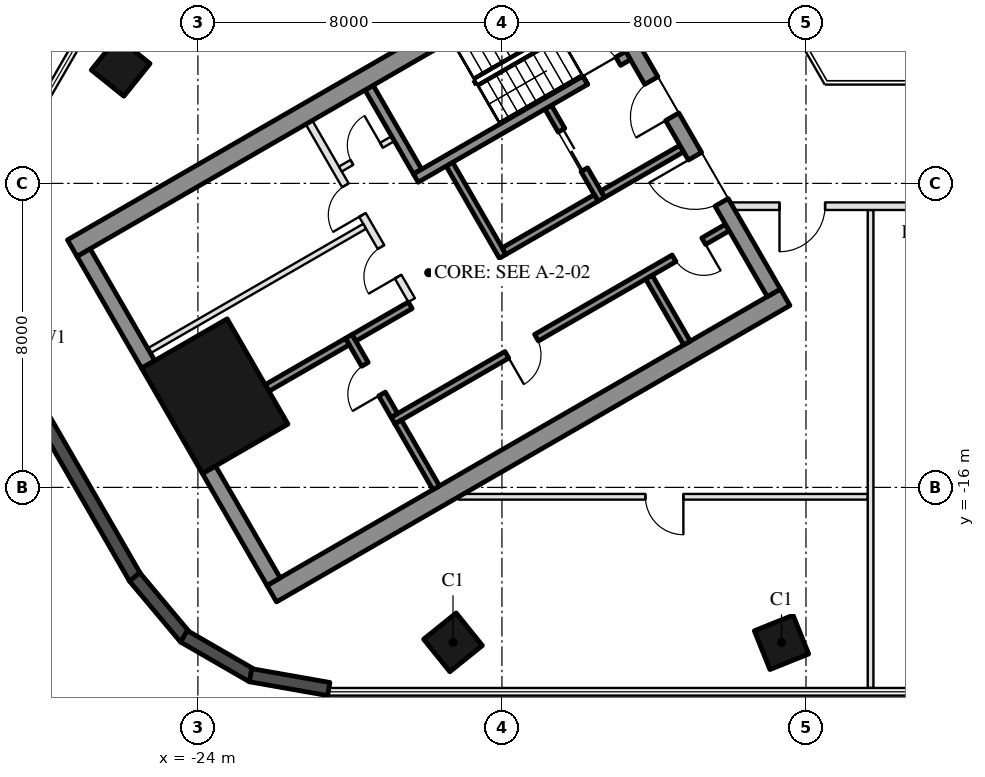
"""IFC4 building model, lengths in metres.
Left out: names, types, materials, properties, quantities, classifications, styles, units other than length and angle.
Written with IfcOpenShell. Run it as: python <this file> out.ifc"""

import sys

from ifc_helpers import new_model, si_unit, direction, frame, frame_2d, origin, origin_2d, place, context, subcontext, project, spatial, rectangle, hollow_rectangle, extrude, boolean, halfspace, element, fill, save


model = new_model("IFC4")
c1 = context("Model", 3, precision=1e-05, world=origin(), true_north=direction((0.0, 1.0)))
c2 = subcontext(c1, "Body", "Model", "MODEL_VIEW")
j1 = project(units=[si_unit("LENGTHUNIT", "METRE"), si_unit("PLANEANGLEUNIT", "RADIAN")], contexts=[c1])
p1 = place(None, origin())
s1 = spatial("IfcSite", under=j1, at=p1, CompositionType="ELEMENT")
p2 = place(p1, origin())
s2 = spatial("IfcBuilding", under=s1, at=p2, CompositionType="ELEMENT")
p3 = place(p2, frame((0.0, 0.0, 9.0)))
s3 = spatial("IfcBuildingStorey", under=s2, at=p3, CompositionType="ELEMENT", Elevation=9.0)
p4 = place(p3, frame((-17.288, -20.078, 0.0), z_axis=(0.091482931519, 0.113703399857, 0.989293894705), x_axis=(-0.99579173161, 0.005008593821, 0.091508148518)))
e1 = element("IfcColumn", 1, at=p4, inside=s3, PredefinedType="COLUMN", context=c2, shape_type="SweptSolid", body=[
    boolean("DIFFERENCE", boolean("DIFFERENCE", extrude(hollow_rectangle(XDim=1.1, YDim=1.1, WallThickness=0.05, at=origin_2d()), origin(), (0.0, 0.0, 1.0), 6.57), halfspace(frame((0.0, 0.0, 0.019), z_axis=(0.0, 0.0, 1.0), x_axis=(1.0, 0.0, 0.0)), True)), halfspace(frame((0.0, 0.0, 6.552), z_axis=(0.0, 0.0, 1.0), x_axis=(1.0, 0.0, 0.0)), False)),
])
p5 = place(p3, frame((-8.644, -20.078, 0.0), z_axis=(0.04588570117, 0.114061937921, 0.9924134102), x_axis=(-0.998942832746, 0.002476202234, 0.045902999109)))
e2 = element("IfcColumn", 2, at=p5, inside=s3, PredefinedType="COLUMN", context=c2, shape_type="SweptSolid", body=[
    boolean("DIFFERENCE", boolean("DIFFERENCE", extrude(hollow_rectangle(XDim=1.1, YDim=1.1, WallThickness=0.05, at=origin_2d()), origin(), (0.0, 0.0, 1.0), 6.55), halfspace(frame((0.0, 0.0, 0.017), z_axis=(0.0, 0.0, 1.0), x_axis=(1.0, 0.0, 0.0)), True)), halfspace(frame((0.0, 0.0, 6.534), z_axis=(0.0, 0.0, 1.0), x_axis=(1.0, 0.0, 0.0)), False)),
])
p6 = place(p3, frame((-26.032, -4.932, 0.0), z_axis=(0.144210024077, 0.022406246977, 0.989293398872), x_axis=(-0.493357756794, -0.864999630049, 0.091508271899)))
e3 = element("IfcColumn", 3, at=p6, inside=s3, PredefinedType="COLUMN", context=c2, shape_type="SweptSolid", body=[
    boolean("DIFFERENCE", boolean("DIFFERENCE", extrude(hollow_rectangle(XDim=1.1, YDim=1.1, WallThickness=0.05, at=origin_2d()), origin(), (0.0, 0.0, 1.0), 6.57), halfspace(frame((0.0, 0.0, 0.019), z_axis=(0.0, 0.0, 1.0), x_axis=(1.0, 0.0, 0.0)), True)), halfspace(frame((0.0, 0.0, 6.552), z_axis=(0.0, 0.0, 1.0), x_axis=(1.0, 0.0, 0.0)), False)),
])
p7 = place(p3, frame((-23.556, -13.6, 0.0), z_axis=(0.0, 0.0, 1.0), x_axis=(-0.5, 0.866025403784, 0.0)))
e4 = element("IfcColumn", 4, at=p7, inside=s3, PredefinedType="COLUMN", context=c2, shape_type="SweptSolid", body=[
    extrude(hollow_rectangle(XDim=3.2, YDim=2.6, WallThickness=0.08, at=origin_2d()), origin(), (0.0, 0.0, 1.0), 6.5),
])
p8 = place(p3, frame((-28.743, -13.021, 0.0), z_axis=(0.0, 0.0, 1.0), x_axis=(0.499981900942, -0.866035853028, 0.0)))
e5 = element("IfcWall", 5, at=p8, inside=s3, PredefinedType="SOLIDWALL", context=c2, shape_type="SweptSolid", body=[
    extrude(rectangle(XDim=6.191, YDim=0.35, at=frame_2d((3.095, 0.0))), origin(), (0.0, 0.0, 1.0), 6.15),
])
p9 = place(p3, frame((-25.665, -18.357, 0.0), z_axis=(0.0, 0.0, 1.0), x_axis=(0.642731712352, -0.766091343076, 0.0)))
e6 = element("IfcWall", 6, at=p9, inside=s3, PredefinedType="SOLIDWALL", context=c2, shape_type="SweptSolid", body=[
    extrude(rectangle(XDim=2.09, YDim=0.35, at=frame_2d((1.045, 0.0))), origin(), (0.0, 0.0, 1.0), 6.15),
])
p10 = place(p3, frame((-24.368, -19.919, 0.0), z_axis=(0.0, 0.0, 1.0), x_axis=(0.866049423672, -0.499958394027, 0.0)))
e7 = element("IfcWall", 7, at=p10, inside=s3, PredefinedType="SOLIDWALL", context=c2, shape_type="SweptSolid", body=[
    extrude(rectangle(XDim=2.09, YDim=0.35, at=frame_2d((1.045, 0.0))), origin(), (0.0, 0.0, 1.0), 6.15),
])
p11 = place(p3, frame((-22.615, -20.943, 0.0), z_axis=(0.0, 0.0, 1.0), x_axis=(0.984816471064, -0.173598727877, 0.0)))
e8 = element("IfcWall", 8, at=p11, inside=s3, PredefinedType="SOLIDWALL", context=c2, shape_type="SweptSolid", body=[
    extrude(rectangle(XDim=2.09, YDim=0.35, at=frame_2d((1.045, 0.0))), origin(), (0.0, 0.0, 1.0), 6.15),
])
p12 = place(p3, frame((-8.547, -10.997, 0.0), z_axis=(0.0, 0.0, 1.0), x_axis=(-0.866024264262, -0.500001973705, 0.0)))
e9 = element("IfcWall", 9, at=p12, inside=s3, PredefinedType="SHEAR", context=c2, shape_type="SweptSolid", body=[
    extrude(rectangle(XDim=15.6, YDim=0.5, at=frame_2d((7.8, 0.0))), origin(), (0.0, 0.0, 1.0), 6.15),
])
p13 = place(p3, frame((-23.708, -15.536, 0.0), z_axis=(0.0, 0.0, 1.0), x_axis=(0.500008388397, -0.866020560687, 0.0)))
e10 = element("IfcWall", 10, at=p13, inside=s3, PredefinedType="SHEAR", context=c2, shape_type="SweptSolid", body=[
    extrude(rectangle(XDim=3.4, YDim=0.4, at=frame_2d((1.7, 0.0))), origin(), (0.0, 0.0, 1.0), 6.15),
])
p14 = place(p3, frame((-27.009, -9.82, 0.0), z_axis=(0.0, 0.0, 1.0), x_axis=(0.499977295307, -0.866038511948, 0.0)))
e11 = element("IfcWall", 11, at=p14, inside=s3, PredefinedType="SHEAR", context=c2, shape_type="SweptSolid", body=[
    extrude(rectangle(XDim=3.4, YDim=0.4, at=frame_2d((1.7, 0.0))), origin(), (0.0, 0.0, 1.0), 6.15),
])
p15 = place(p3, frame((-19.496, -5.482, 0.0), z_axis=(0.0, 0.0, 1.0), x_axis=(0.499990435942, -0.866030925526, 0.0)))
e12 = element("IfcWall", 12, at=p15, inside=s3, PredefinedType="SHEAR", context=c2, shape_type="SweptSolid", body=[
    extrude(rectangle(XDim=2.55, YDim=0.25, at=frame_2d((1.275, 0.0))), origin(), (0.0, 0.0, 1.0), 6.15),
])
p16 = place(p3, frame((-17.381, -7.495, 0.0), z_axis=(0.0, 0.0, 1.0), x_axis=(0.500011755427, -0.866018616679, 0.0)))
e13 = element("IfcWall", 13, at=p16, inside=s3, PredefinedType="SHEAR", context=c2, shape_type="SweptSolid", body=[
    extrude(rectangle(XDim=2.8, YDim=0.2, at=frame_2d((1.4, 0.0))), origin(), (0.0, 0.0, 1.0), 6.15),
])
p17 = place(p3, frame((-14.783, -5.995, 0.0), z_axis=(0.0, 0.0, 1.0), x_axis=(0.49994636267, -0.866056369097, 0.0)))
e14 = element("IfcWall", 14, at=p17, inside=s3, PredefinedType="SHEAR", context=c2, shape_type="SweptSolid", body=[
    extrude(rectangle(XDim=2.8, YDim=0.2, at=frame_2d((1.4, 0.0))), origin(), (0.0, 0.0, 1.0), 6.15),
])
p18 = place(p17, frame((0.7, 0.0, 0.0)))
e15 = element("IfcOpeningElement", 15, at=p18, cuts=e14, PredefinedType="OPENING", context=c2, shape_type="SweptSolid", body=[
    extrude(rectangle(XDim=1.2, YDim=2.1, at=frame_2d((0.6, 1.05))), frame((0.0, 0.11, 0.0), z_axis=(0.0, -1.0, 0.0), x_axis=(1.0, 0.0, 0.0)), (0.0, 0.0, 1.0), 0.22),
])
p19 = place(p3, frame((-13.52, -8.383, 0.0), z_axis=(0.0, 0.0, 1.0), x_axis=(-0.866034573852, -0.49998411664, 0.0)))
e16 = element("IfcWall", 16, at=p19, inside=s3, PredefinedType="SHEAR", context=c2, shape_type="SweptSolid", body=[
    extrude(rectangle(XDim=2.8, YDim=0.2, at=frame_2d((1.4, 0.0))), origin(), (0.0, 0.0, 1.0), 6.15),
])
p20 = place(p3, frame((-11.268, -7.083, 0.0), z_axis=(0.0, 0.0, 1.0), x_axis=(-0.866050077142, -0.499957262057, 0.0)))
e17 = element("IfcWall", 17, at=p20, inside=s3, PredefinedType="SHEAR", context=c2, shape_type="SweptSolid", body=[
    extrude(rectangle(XDim=2.4, YDim=0.2, at=frame_2d((1.2, 0.0))), origin(), (0.0, 0.0, 1.0), 6.15),
])
p21 = place(p3, frame((-10.068, -9.162, 0.0), z_axis=(0.0, 0.0, 1.0), x_axis=(-0.866032725843, -0.499987317609, 0.0)))
e18 = element("IfcWall", 18, at=p21, inside=s3, PredefinedType="SHEAR", context=c2, shape_type="SweptSolid", body=[
    extrude(rectangle(XDim=10.16, YDim=0.2, at=frame_2d((5.08, 0.0))), origin(), (0.0, 0.0, 1.0), 6.15),
])
p22 = place(p21, frame((0.72, 0.0, 0.0)))
e19 = element("IfcOpeningElement", 19, at=p22, cuts=e18, PredefinedType="OPENING", context=c2, shape_type="SweptSolid", body=[
    extrude(rectangle(XDim=0.9, YDim=2.1, at=frame_2d((0.45, 1.05))), frame((0.0, 0.11, 0.0), z_axis=(0.0, -1.0, 0.0), x_axis=(1.0, 0.0, 0.0)), (0.0, 0.0, 1.0), 0.22),
])
p23 = place(p21, frame((5.8, 0.0, 0.0)))
e20 = element("IfcOpeningElement", 20, at=p23, cuts=e18, PredefinedType="OPENING", context=c2, shape_type="SweptSolid", body=[
    extrude(rectangle(XDim=0.9, YDim=2.1, at=frame_2d((0.45, 1.05))), frame((0.0, 0.11, 0.0), z_axis=(0.0, -1.0, 0.0), x_axis=(1.0, 0.0, 0.0)), (0.0, 0.0, 1.0), 0.22),
])
p24 = place(p3, frame((-20.031, -12.026, 0.0), z_axis=(0.0, 0.0, 1.0), x_axis=(0.500033551112, -0.866006032174, 0.0)))
e21 = element("IfcWall", 21, at=p24, inside=s3, PredefinedType="SHEAR", context=c2, shape_type="SweptSolid", body=[
    extrude(rectangle(XDim=2.4, YDim=0.2, at=frame_2d((1.2, 0.0))), origin(), (0.0, 0.0, 1.0), 6.15),
])
p25 = place(p24, frame((0.85, 0.0, 0.0)))
e22 = element("IfcOpeningElement", 22, at=p25, cuts=e21, PredefinedType="OPENING", context=c2, shape_type="SweptSolid", body=[
    extrude(rectangle(XDim=0.9, YDim=2.1, at=frame_2d((0.45, 1.05))), frame((0.0, 0.11, 0.0), z_axis=(0.0, -1.0, 0.0), x_axis=(1.0, 0.0, 0.0)), (0.0, 0.0, 1.0), 0.22),
])
p26 = place(p3, frame((-18.413, -11.208, 0.0), z_axis=(0.0, 0.0, 1.0), x_axis=(-0.866038183914, -0.499977863513, 0.0)))
e23 = element("IfcWall", 23, at=p26, inside=s3, PredefinedType="SHEAR", context=c2, shape_type="SweptSolid", body=[
    extrude(rectangle(XDim=1.71, YDim=0.2, at=frame_2d((0.855, 0.0))), origin(), (0.0, 0.0, 1.0), 6.15),
])
for number, where, z_axis, x_axis in (
    (24, (-12.131, -10.468, 0.0), (0.0, 0.0, 1.0), (0.5, -0.866, 0.0)),
    (25, (-18.73, -14.278, 0.0), (0.0, 0.0, 1.0), (0.5, -0.866, 0.0)),
):
    element("IfcWall", number, at=place(p3, frame(where, z_axis=z_axis, x_axis=x_axis)), inside=s3, PredefinedType="SHEAR", context=c2, shape_type="SweptSolid", body=[
        extrude(rectangle(XDim=2.0, YDim=0.2, at=frame_2d((1.0, 0.0))), origin(), (0.0, 0.0, 1.0), 6.15),
    ])
p27 = place(p3, frame((-20.067, -12.163, 0.0), z_axis=(0.0, 0.0, 1.0), x_axis=(-0.866048967903, -0.499959183527, 0.0)))
e26 = element("IfcWall", 26, at=p27, inside=s3, PredefinedType="SHEAR", context=c2, shape_type="SweptSolid", body=[
    extrude(rectangle(XDim=2.44, YDim=0.2, at=frame_2d((1.22, 0.0))), origin(), (0.0, 0.0, 1.0), 6.15),
])
p28 = place(p3, frame((-21.076, -6.395, 0.0), z_axis=(0.0, 0.0, 1.0), x_axis=(0.50001468107, -0.866016927499, 0.0)))
e27 = element("IfcWall", 27, at=p28, inside=s3, PredefinedType="PARTITIONING", context=c2, shape_type="SweptSolid", body=[
    extrude(rectangle(XDim=5.4, YDim=0.2, at=frame_2d((2.7, 0.0))), origin(), (0.0, 0.0, 1.0), 6.15),
])
p29 = place(p28, frame((1.913, 0.0, 0.0)))
e28 = element("IfcOpeningElement", 28, at=p29, cuts=e27, PredefinedType="OPENING", context=c2, shape_type="SweptSolid", body=[
    extrude(rectangle(XDim=0.9, YDim=2.1, at=frame_2d((0.45, 1.05))), frame((0.0, 0.11, 0.0), z_axis=(0.0, -1.0, 0.0), x_axis=(1.0, 0.0, 0.0)), (0.0, 0.0, 1.0), 0.22),
])
p30 = place(p28, frame((3.788, 0.0, 0.0)))
e29 = element("IfcOpeningElement", 29, at=p30, cuts=e27, PredefinedType="OPENING", context=c2, shape_type="SweptSolid", body=[
    extrude(rectangle(XDim=0.9, YDim=2.1, at=frame_2d((0.45, 1.05))), frame((0.0, 0.11, 0.0), z_axis=(0.0, -1.0, 0.0), x_axis=(1.0, 0.0, 0.0)), (0.0, 0.0, 1.0), 0.22),
])
p31 = place(p3, frame((-18.866, -6.822, 0.0), z_axis=(0.0, 0.0, 1.0), x_axis=(-0.866028054938, -0.499995408039, 0.0)))
e30 = element("IfcWall", 30, at=p31, inside=s3, PredefinedType="PARTITIONING", context=c2, shape_type="SweptSolid", body=[
    extrude(rectangle(XDim=1.6, YDim=0.15, at=frame_2d((0.8, 0.0))), origin(), (0.0, 0.0, 1.0), 6.15),
])
p32 = place(p31, frame((0.35, 0.0, 0.0)))
e31 = element("IfcOpeningElement", 31, at=p32, cuts=e30, PredefinedType="OPENING", context=c2, shape_type="SweptSolid", body=[
    extrude(rectangle(XDim=0.9, YDim=2.1, at=frame_2d((0.45, 1.05))), frame((0.0, 0.085, 0.0), z_axis=(0.0, -1.0, 0.0), x_axis=(1.0, 0.0, 0.0)), (0.0, 0.0, 1.0), 0.17),
])
p33 = place(p3, frame((-19.613, -9.13, 0.0), z_axis=(0.0, 0.0, 1.0), x_axis=(-0.866037242061, -0.499979494943, 0.0)))
e32 = element("IfcWall", 32, at=p33, inside=s3, PredefinedType="PARTITIONING", context=c2, shape_type="SweptSolid", body=[
    extrude(rectangle(XDim=6.55, YDim=0.15, at=frame_2d((3.275, 0.0))), origin(), (0.0, 0.0, 1.0), 6.15),
])
p34 = place(p3, frame((-15.274, -2.756, 0.0), z_axis=(0.0, 0.0, 1.0), x_axis=(-0.86602318214, -0.500003847982, 0.0)))
e33 = element("IfcWall", 33, at=p34, inside=s3, PredefinedType="SHEAR", context=c2, shape_type="SweptSolid", body=[
    extrude(rectangle(XDim=13.894, YDim=0.5, at=frame_2d((6.947, 0.0))), origin(), (0.0, 0.0, 1.0), 6.15),
])
p35 = place(p3, frame((-12.57, -4.428, 0.0), z_axis=(0.0, 0.0, 1.0), x_axis=(0.499984378957, -0.86603442241, 0.0)))
e34 = element("IfcWall", 34, at=p35, inside=s3, PredefinedType="SHEAR", context=c2, shape_type="SweptSolid", body=[
    extrude(rectangle(XDim=7.45, YDim=0.4, at=frame_2d((3.725, 0.0))), origin(), (0.0, 0.0, 1.0), 6.15),
])
p36 = place(p35, frame((1.0, 0.0, 0.0)))
e35 = element("IfcOpeningElement", 35, at=p36, cuts=e34, PredefinedType="OPENING", context=c2, shape_type="SweptSolid", body=[
    extrude(rectangle(XDim=1.1, YDim=2.1, at=frame_2d((0.55, 1.05))), frame((0.0, 0.21, 0.0), z_axis=(0.0, -1.0, 0.0), x_axis=(1.0, 0.0, 0.0)), (0.0, 0.0, 1.0), 0.42),
])
p37 = place(p35, frame((3.3, 0.0, 0.0)))
e36 = element("IfcOpeningElement", 36, at=p37, cuts=e34, PredefinedType="OPENING", context=c2, shape_type="SweptSolid", body=[
    extrude(rectangle(XDim=1.4, YDim=2.1, at=frame_2d((0.7, 1.05))), frame((0.0, 0.21, 0.0), z_axis=(0.0, -1.0, 0.0), x_axis=(1.0, 0.0, 0.0)), (0.0, 0.0, 1.0), 0.42),
])
p38 = place(p3, frame((-12.681, -4.636, 0.0), z_axis=(0.0, 0.0, 1.0), x_axis=(-0.86601437931, -0.500019094464, 0.0)))
e37 = element("IfcWall", 37, at=p38, inside=s3, PredefinedType="SHEAR", context=c2, shape_type="SweptSolid", body=[
    extrude(rectangle(XDim=1.306, YDim=0.25, at=frame_2d((0.653, 0.0))), origin(), (0.0, 0.0, 1.0), 6.15),
])
p39 = place(p38, frame((0.3, 0.0, 0.0)))
e38 = element("IfcOpeningElement", 38, at=p39, cuts=e37, PredefinedType="OPENING", context=c2, shape_type="SweptSolid", body=[
    extrude(rectangle(XDim=1.0, YDim=2.1, at=frame_2d((0.5, 1.05))), frame((0.0, 0.135, 0.0), z_axis=(0.0, -1.0, 0.0), x_axis=(1.0, 0.0, 0.0)), (0.0, 0.0, 1.0), 0.27),
])
p40 = place(p3, frame((-13.812, -5.29, 0.0), z_axis=(0.0, 0.0, 1.0), x_axis=(-0.866023561601, -0.500003190742, 0.0)))
e39 = element("IfcWall", 39, at=p40, inside=s3, PredefinedType="SHEAR", context=c2, shape_type="SweptSolid", body=[
    extrude(rectangle(XDim=5.144, YDim=0.25, at=frame_2d((2.572, 0.0))), origin(), (0.0, 0.0, 1.0), 6.15),
])
p41 = place(p3, frame((-17.141, -16.247, 0.0), z_axis=(0.0, 0.0, 1.0), x_axis=(1.0, 0.0, 0.0)))
e40 = element("IfcWall", 40, at=p41, inside=s3, PredefinedType="PARTITIONING", context=c2, shape_type="SweptSolid", body=[
    extrude(rectangle(XDim=10.766, YDim=0.15, at=frame_2d((5.383, 0.0))), origin(), (0.0, 0.0, 1.0), 5.36),
])
p42 = place(p41, frame((4.915, 0.0, 0.0)))
e41 = element("IfcOpeningElement", 41, at=p42, cuts=e40, PredefinedType="OPENING", context=c2, shape_type="SweptSolid", body=[
    extrude(rectangle(XDim=1.0, YDim=2.1, at=frame_2d((0.5, 1.05))), frame((0.0, 0.085, 0.0), z_axis=(0.0, -1.0, 0.0), x_axis=(1.0, 0.0, 0.0)), (0.0, 0.0, 1.0), 0.17),
])
p43 = place(p3, frame((-6.3, -21.278, 0.0), z_axis=(0.0, 0.0, 1.0), x_axis=(0.0, 1.0, 0.0)))
e42 = element("IfcWall", 42, at=p43, inside=s3, PredefinedType="PARTITIONING", context=c2, shape_type="SweptSolid", body=[
    extrude(rectangle(XDim=12.578, YDim=0.15, at=frame_2d((6.289, 0.0))), origin(), (0.0, 0.0, 1.0), 5.55),
])
p44 = place(p3, frame((-9.93, -8.6, 0.0), z_axis=(0.0, 0.0, 1.0), x_axis=(1.0, 0.0, 0.0)))
e43 = element("IfcWall", 43, at=p44, inside=s3, PredefinedType="PARTITIONING", context=c2, shape_type="SweptSolid", body=[
    extrude(rectangle(XDim=19.861, YDim=0.2, at=frame_2d((9.93, 0.0))), origin(), (0.0, 0.0, 1.0), 5.36),
])
p45 = place(p44, frame((1.234, 0.0, 0.0)))
e44 = element("IfcOpeningElement", 44, at=p45, cuts=e43, PredefinedType="OPENING", context=c2, shape_type="SweptSolid", body=[
    extrude(rectangle(XDim=1.2, YDim=2.1, at=frame_2d((0.6, 1.05))), frame((0.0, 0.11, 0.0), z_axis=(0.0, -1.0, 0.0), x_axis=(1.0, 0.0, 0.0)), (0.0, 0.0, 1.0), 0.22),
])
p46 = place(p44, frame((5.537, 0.0, 0.0)))
e45 = element("IfcOpeningElement", 45, at=p46, cuts=e43, PredefinedType="OPENING", context=c2, shape_type="SweptSolid", body=[
    extrude(rectangle(XDim=1.8, YDim=2.4, at=frame_2d((0.9, 1.2))), frame((0.0, 0.11, 0.0), z_axis=(0.0, -1.0, 0.0), x_axis=(1.0, 0.0, 0.0)), (0.0, 0.0, 1.0), 0.22),
])
p47 = place(p44, frame((11.224, 0.0, 0.0)))
e46 = element("IfcOpeningElement", 46, at=p47, cuts=e43, PredefinedType="OPENING", context=c2, shape_type="SweptSolid", body=[
    extrude(rectangle(XDim=1.8, YDim=2.4, at=frame_2d((0.9, 1.2))), frame((0.0, 0.11, 0.0), z_axis=(0.0, -1.0, 0.0), x_axis=(1.0, 0.0, 0.0)), (0.0, 0.0, 1.0), 0.22),
])
p48 = place(p44, frame((16.877, 0.0, 0.0)))
e47 = element("IfcOpeningElement", 47, at=p48, cuts=e43, PredefinedType="OPENING", context=c2, shape_type="SweptSolid", body=[
    extrude(rectangle(XDim=1.0, YDim=2.1, at=frame_2d((0.5, 1.05))), frame((0.0, 0.11, 0.0), z_axis=(0.0, -1.0, 0.0), x_axis=(1.0, 0.0, 0.0)), (0.0, 0.0, 1.0), 0.22),
])
p49 = place(p18, origin())
e48 = element("IfcDoor", 48, at=p49, inside=s3, OperationType="DOUBLE_DOOR_SLIDING", PredefinedType="DOOR", context=c2, shape_type="SweptSolid", body=[
    extrude(rectangle(XDim=1.2, YDim=2.1, at=frame_2d((0.6, 1.05))), frame((0.0, 0.025, 0.0), z_axis=(0.0, -1.0, 0.0), x_axis=(1.0, 0.0, 0.0)), (0.0, 0.0, 1.0), 0.05),
])
fill(e15, e48)
p50 = place(p32, frame((0.9, 0.0, 0.0), z_axis=(0.0, 0.0, 1.0), x_axis=(-1.0, 0.0, 0.0)))
e49 = element("IfcDoor", 49, at=p50, inside=s3, OperationType="SINGLE_SWING_RIGHT", PredefinedType="DOOR", context=c2, shape_type="SweptSolid", body=[
    extrude(rectangle(XDim=0.9, YDim=2.1, at=frame_2d((0.45, 1.05))), frame((0.0, 0.025, 0.0), z_axis=(0.0, -1.0, 0.0), x_axis=(1.0, 0.0, 0.0)), (0.0, 0.0, 1.0), 0.05),
])
fill(e31, e49)
p51 = place(p22, origin())
e50 = element("IfcDoor", 50, at=p51, inside=s3, OperationType="SINGLE_SWING_LEFT", PredefinedType="DOOR", context=c2, shape_type="SweptSolid", body=[
    extrude(rectangle(XDim=0.9, YDim=2.1, at=frame_2d((0.45, 1.05))), frame((0.0, 0.025, 0.0), z_axis=(0.0, -1.0, 0.0), x_axis=(1.0, 0.0, 0.0)), (0.0, 0.0, 1.0), 0.05),
])
fill(e19, e50)
p52 = place(p23, origin())
e51 = element("IfcDoor", 51, at=p52, inside=s3, OperationType="SINGLE_SWING_RIGHT", PredefinedType="DOOR", context=c2, shape_type="SweptSolid", body=[
    extrude(rectangle(XDim=0.9, YDim=2.1, at=frame_2d((0.45, 1.05))), frame((0.0, 0.025, 0.0), z_axis=(0.0, -1.0, 0.0), x_axis=(1.0, 0.0, 0.0)), (0.0, 0.0, 1.0), 0.05),
])
fill(e20, e51)
p53 = place(p25, frame((0.9, 0.0, 0.0), z_axis=(0.0, 0.0, 1.0), x_axis=(-1.0, 0.0, 0.0)))
e52 = element("IfcDoor", 52, at=p53, inside=s3, OperationType="SINGLE_SWING_LEFT", PredefinedType="DOOR", context=c2, shape_type="SweptSolid", body=[
    extrude(rectangle(XDim=0.9, YDim=2.1, at=frame_2d((0.45, 1.05))), frame((0.0, 0.025, 0.0), z_axis=(0.0, -1.0, 0.0), x_axis=(1.0, 0.0, 0.0)), (0.0, 0.0, 1.0), 0.05),
])
fill(e22, e52)
p54 = place(p29, frame((0.9, 0.0, 0.0), z_axis=(0.0, 0.0, 1.0), x_axis=(-1.0, 0.0, 0.0)))
e53 = element("IfcDoor", 53, at=p54, inside=s3, OperationType="SINGLE_SWING_LEFT", PredefinedType="DOOR", context=c2, shape_type="SweptSolid", body=[
    extrude(rectangle(XDim=0.9, YDim=2.1, at=frame_2d((0.45, 1.05))), frame((0.0, 0.025, 0.0), z_axis=(0.0, -1.0, 0.0), x_axis=(1.0, 0.0, 0.0)), (0.0, 0.0, 1.0), 0.05),
])
fill(e28, e53)
p55 = place(p30, frame((0.9, 0.0, 0.0), z_axis=(0.0, 0.0, 1.0), x_axis=(-1.0, 0.0, 0.0)))
e54 = element("IfcDoor", 54, at=p55, inside=s3, OperationType="SINGLE_SWING_LEFT", PredefinedType="DOOR", context=c2, shape_type="SweptSolid", body=[
    extrude(rectangle(XDim=0.9, YDim=2.1, at=frame_2d((0.45, 1.05))), frame((0.0, 0.025, 0.0), z_axis=(0.0, -1.0, 0.0), x_axis=(1.0, 0.0, 0.0)), (0.0, 0.0, 1.0), 0.05),
])
fill(e29, e54)
p56 = place(p36, frame((1.1, 0.0, 0.0), z_axis=(0.0, 0.0, 1.0), x_axis=(-1.0, 0.0, 0.0)))
e55 = element("IfcDoor", 55, at=p56, inside=s3, OperationType="SINGLE_SWING_LEFT", PredefinedType="DOOR", context=c2, shape_type="SweptSolid", body=[
    extrude(rectangle(XDim=1.1, YDim=2.1, at=frame_2d((0.55, 1.05))), frame((0.0, 0.025, 0.0), z_axis=(0.0, -1.0, 0.0), x_axis=(1.0, 0.0, 0.0)), (0.0, 0.0, 1.0), 0.05),
])
fill(e35, e55)
p57 = place(p37, frame((1.4, 0.0, 0.0), z_axis=(0.0, 0.0, 1.0), x_axis=(-1.0, 0.0, 0.0)))
e56 = element("IfcDoor", 56, at=p57, inside=s3, OperationType="DOUBLE_DOOR_SINGLE_SWING", PredefinedType="DOOR", context=c2, shape_type="SweptSolid", body=[
    extrude(rectangle(XDim=1.4, YDim=2.1, at=frame_2d((0.7, 1.05))), frame((0.0, 0.025, 0.0), z_axis=(0.0, -1.0, 0.0), x_axis=(1.0, 0.0, 0.0)), (0.0, 0.0, 1.0), 0.05),
])
fill(e36, e56)
p58 = place(p39, frame((1.0, 0.0, 0.0), z_axis=(0.0, 0.0, 1.0), x_axis=(-1.0, 0.0, 0.0)))
e57 = element("IfcDoor", 57, at=p58, inside=s3, OperationType="SINGLE_SWING_LEFT", PredefinedType="DOOR", context=c2, shape_type="SweptSolid", body=[
    extrude(rectangle(XDim=1.0, YDim=2.1, at=frame_2d((0.5, 1.05))), frame((0.0, 0.025, 0.0), z_axis=(0.0, -1.0, 0.0), x_axis=(1.0, 0.0, 0.0)), (0.0, 0.0, 1.0), 0.05),
])
fill(e38, e57)
p59 = place(p45, frame((1.2, 0.0, 0.0), z_axis=(0.0, 0.0, 1.0), x_axis=(-1.0, 0.0, 0.0)))
e58 = element("IfcDoor", 58, at=p59, inside=s3, OperationType="SINGLE_SWING_RIGHT", PredefinedType="DOOR", context=c2, shape_type="SweptSolid", body=[
    extrude(rectangle(XDim=1.2, YDim=2.1, at=frame_2d((0.6, 1.05))), frame((0.0, 0.025, 0.0), z_axis=(0.0, -1.0, 0.0), x_axis=(1.0, 0.0, 0.0)), (0.0, 0.0, 1.0), 0.05),
])
fill(e44, e58)
p60 = place(p42, frame((1.0, 0.0, 0.0), z_axis=(0.0, 0.0, 1.0), x_axis=(-1.0, 0.0, 0.0)))
e59 = element("IfcDoor", 59, at=p60, inside=s3, OperationType="SINGLE_SWING_LEFT", PredefinedType="DOOR", context=c2, shape_type="SweptSolid", body=[
    extrude(rectangle(XDim=1.0, YDim=2.1, at=frame_2d((0.5, 1.05))), frame((0.0, 0.025, 0.0), z_axis=(0.0, -1.0, 0.0), x_axis=(1.0, 0.0, 0.0)), (0.0, 0.0, 1.0), 0.05),
])
fill(e41, e59)
save(model, sys.argv[1])
